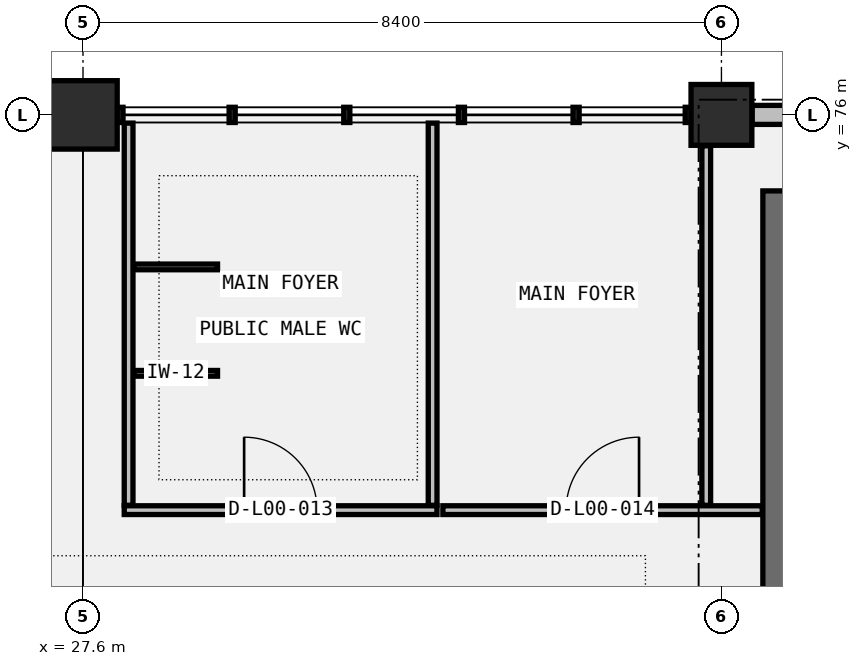
"""IFC4 building model, lengths in metres.
Left out: names, types, materials, properties, quantities, classifications, styles, units other than length and angle.
Written with IfcOpenShell. Run it as: python <this file> out.ifc"""

import sys

from ifc_helpers import new_model, si_unit, direction, frame, frame_2d, origin, origin_2d, place, context, subcontext, project, spatial, rectangle, circle, extrude, element, fill, save


model = new_model("IFC4")
c1 = context("Model", 3, precision=1e-05, world=origin(), true_north=direction((0.0, 1.0)))
c2 = subcontext(c1, "Body", "Model", "MODEL_VIEW")
j1 = project(units=[si_unit("LENGTHUNIT", "METRE"), si_unit("PLANEANGLEUNIT", "RADIAN")], contexts=[c1])
p1 = place(None, origin())
s1 = spatial("IfcSite", under=j1, at=p1, CompositionType="ELEMENT")
p2 = place(p1, origin())
s2 = spatial("IfcBuilding", under=s1, at=p2, CompositionType="ELEMENT")
p3 = place(p2, origin())
s3 = spatial("IfcBuildingStorey", under=s2, at=p3, CompositionType="ELEMENT", Elevation=0.0)
p4 = place(p3, frame((27.6, 76.0, -0.3), z_axis=(0.0, 0.0, 1.0), x_axis=(1.0, 0.0, 0.0)))
e1 = element("IfcColumn", 1, at=p4, inside=s3, PredefinedType="COLUMN", context=c2, shape_type="SweptSolid", body=[
    extrude(circle(Radius=0.45, at=origin_2d()), origin(), (0.0, 0.0, 1.0), 5.7),
])
p5 = place(p3, frame((36.0, 76.0, -0.3), z_axis=(0.0, 0.0, 1.0), x_axis=(1.0, 0.0, 0.0)))
e2 = element("IfcColumn", 2, at=p5, inside=s3, PredefinedType="COLUMN", context=c2, shape_type="SweptSolid", body=[
    extrude(circle(Radius=0.4, at=origin_2d()), origin(), (0.0, 0.0, 1.0), 5.7),
])
p6 = place(p3, frame((36.72, 75.0, -0.3), z_axis=(0.0, 0.0, 1.0), x_axis=(0.0, -1.0, 0.0)))
e3 = element("IfcWall", 3, at=p6, inside=s3, PredefinedType="SHEAR", context=c2, shape_type="SweptSolid", body=[
    extrude(rectangle(XDim=8.15, YDim=0.35, at=frame_2d((4.075, 0.0))), origin(), (0.0, 0.0, 1.0), 5.46),
])
p7 = place(p3, frame((36.404, 76.0, 0.0), z_axis=(0.0, 0.0, 1.0), x_axis=(1.0, 0.0, 0.0)))
e4 = element("IfcWall", 4, at=p7, inside=s3, PredefinedType="STANDARD", context=c2, shape_type="SweptSolid", body=[
    extrude(rectangle(XDim=7.592, YDim=0.25, at=frame_2d((3.796, 0.0))), origin(), (0.0, 0.0, 1.0), 4.65),
])
p8 = place(p7, frame((2.796, 0.0, 0.85)))
e5 = element("IfcOpeningElement", 5, at=p8, cuts=e4, PredefinedType="OPENING", context=c2, shape_type="SweptSolid", body=[
    extrude(rectangle(XDim=2.0, YDim=2.0, at=frame_2d((1.0, 1.0))), frame((0.0, 0.135, 0.0), z_axis=(0.0, -1.0, 0.0), x_axis=(1.0, 0.0, 0.0)), (0.0, 0.0, 1.0), 0.27),
])
p9 = place(p3, frame((28.143, 70.8, 0.0), z_axis=(0.0, 0.0, 1.0), x_axis=(1.0, 0.0, 0.0)))
e6 = element("IfcWall", 6, at=p9, inside=s3, PredefinedType="PARTITIONING", context=c2, shape_type="SweptSolid", body=[
    extrude(rectangle(XDim=4.115, YDim=0.115, at=frame_2d((2.058, 0.0))), origin(), (0.0, 0.0, 1.0), 4.738),
])
p10 = place(p9, frame((1.577, 0.0, 0.0)))
e7 = element("IfcOpeningElement", 7, at=p10, cuts=e6, PredefinedType="OPENING", context=c2, shape_type="SweptSolid", body=[
    extrude(rectangle(XDim=0.96, YDim=2.08, at=frame_2d((0.48, 1.04))), frame((0.0, 0.067, 0.0), z_axis=(0.0, -1.0, 0.0), x_axis=(1.0, 0.0, 0.0)), (0.0, 0.0, 1.0), 0.135),
])
for number, where, z_axis, x_axis in (
    (8, (28.2, 70.864, 0.0), (0.0, 0.0, 1.0), (0.0, 1.0, 0.0)),
    (9, (32.2, 70.864, 0.0), (0.0, 0.0, 1.0), (0.0, 1.0, 0.0)),
):
    element("IfcWall", number, at=place(p3, frame(where, z_axis=z_axis, x_axis=x_axis)), inside=s3, PredefinedType="PARTITIONING", context=c2, shape_type="SweptSolid", body=[
        extrude(rectangle(XDim=5.029, YDim=0.115, at=frame_2d((2.514, 0.0))), origin(), (0.0, 0.0, 1.0), 4.65),
    ])
p11 = place(p3, frame((32.335, 70.8, 0.0), z_axis=(0.0, 0.0, 1.0), x_axis=(1.0, 0.0, 0.0)))
e10 = element("IfcWall", 10, at=p11, inside=s3, PredefinedType="PARTITIONING", context=c2, shape_type="SweptSolid", body=[
    extrude(rectangle(XDim=4.202, YDim=0.115, at=frame_2d((2.101, 0.0))), origin(), (0.0, 0.0, 1.0), 4.738),
])
p12 = place(p11, frame((1.621, 0.0, 0.0)))
e11 = element("IfcOpeningElement", 11, at=p12, cuts=e10, PredefinedType="OPENING", context=c2, shape_type="SweptSolid", body=[
    extrude(rectangle(XDim=0.96, YDim=2.08, at=frame_2d((0.48, 1.04))), frame((0.0, 0.067, 0.0), z_axis=(0.0, -1.0, 0.0), x_axis=(1.0, 0.0, 0.0)), (0.0, 0.0, 1.0), 0.135),
])
p13 = place(p3, frame((35.8, 70.864, 0.0), z_axis=(0.0, 0.0, 1.0), x_axis=(0.0, 1.0, 0.0)))
e12 = element("IfcWall", 12, at=p13, inside=s3, PredefinedType="PARTITIONING", context=c2, shape_type="SweptSolid", body=[
    extrude(rectangle(XDim=4.73, YDim=0.115, at=frame_2d((2.365, 0.0))), origin(), (0.0, 0.0, 1.0), 4.748),
])
for number, where, z_axis, x_axis in (
    (13, (28.27, 72.6, 0.0), (0.0, 0.0, 1.0), (1.0, 0.0, 0.0)),
    (14, (28.27, 74.0, 0.0), (0.0, 0.0, 1.0), (1.0, 0.0, 0.0)),
):
    element("IfcWall", number, at=place(p3, frame(where, z_axis=z_axis, x_axis=x_axis)), inside=s3, PredefinedType="PARTITIONING", context=c2, shape_type="SweptSolid", body=[
        extrude(rectangle(XDim=1.1, YDim=0.075, at=frame_2d((0.55, 0.0))), origin(), (0.0, 0.0, 1.0), 2.05),
    ])
p14 = place(p10, origin())
e15 = element("IfcDoor", 15, at=p14, inside=s3, OperationType="SINGLE_SWING_LEFT", PredefinedType="DOOR", context=c2, shape_type="SweptSolid", body=[
    extrude(rectangle(XDim=0.96, YDim=2.08, at=frame_2d((0.48, 1.04))), frame((0.0, 0.025, 0.0), z_axis=(0.0, -1.0, 0.0), x_axis=(1.0, 0.0, 0.0)), (0.0, 0.0, 1.0), 0.05),
])
fill(e7, e15)
p15 = place(p12, origin())
e16 = element("IfcDoor", 16, at=p15, inside=s3, OperationType="SINGLE_SWING_RIGHT", PredefinedType="DOOR", context=c2, shape_type="SweptSolid", body=[
    extrude(rectangle(XDim=0.96, YDim=2.08, at=frame_2d((0.48, 1.04))), frame((0.0, 0.025, 0.0), z_axis=(0.0, -1.0, 0.0), x_axis=(1.0, 0.0, 0.0)), (0.0, 0.0, 1.0), 0.05),
])
fill(e11, e16)
save(model, sys.argv[1])
